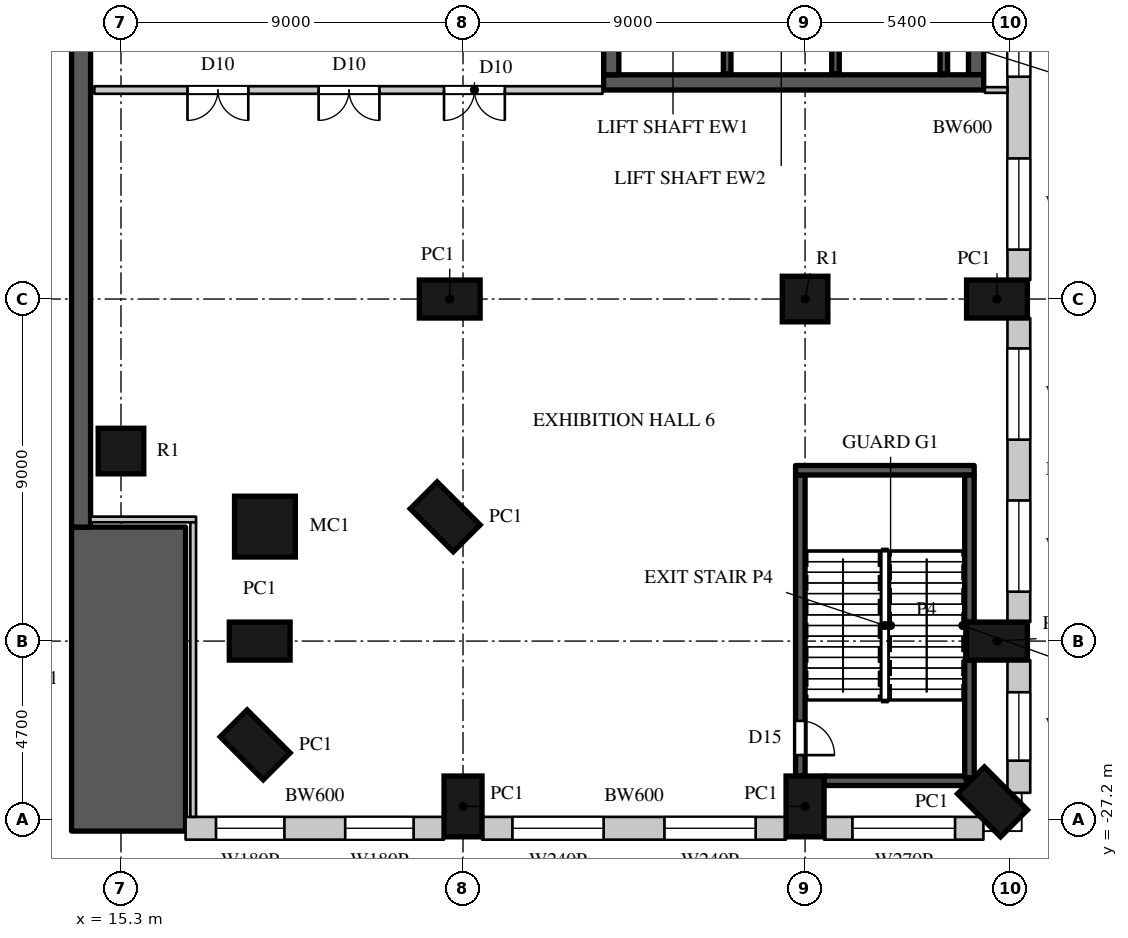
"""IFC4 building model, lengths in metres.
Left out: names, types, materials, properties, quantities, classifications, styles, units other than length and angle.
Written with IfcOpenShell. Run it as: python <this file> out.ifc"""

import sys

from ifc_helpers import new_model, si_unit, direction, frame, frame_2d, origin, origin_2d, place, context, subcontext, project, spatial, rectangle, circle, extrude, element, fill, save


model = new_model("IFC4")
c1 = context("Model", 3, precision=1e-05, world=origin(), true_north=direction((0.0, 1.0)))
c2 = subcontext(c1, "Body", "Model", "MODEL_VIEW")
j1 = project(units=[si_unit("LENGTHUNIT", "METRE"), si_unit("PLANEANGLEUNIT", "RADIAN")], contexts=[c1])
p1 = place(None, origin())
s1 = spatial("IfcSite", under=j1, at=p1, CompositionType="ELEMENT")
p2 = place(p1, origin())
s2 = spatial("IfcBuilding", under=s1, at=p2, CompositionType="ELEMENT")
p3 = place(p2, frame((0.0, 0.0, 9.0)))
s3 = spatial("IfcBuildingStorey", under=s2, at=p3, CompositionType="ELEMENT", Elevation=9.0)
p4 = place(p3, frame((15.5, -27.5, 0.0), z_axis=(0.0, 0.0, 1.0), x_axis=(0.0, 1.0, 0.0)))
e1 = element("IfcWall", 1, at=p4, inside=s3, PredefinedType="SOLIDWALL", context=c2, shape_type="SweptSolid", body=[
    extrude(rectangle(XDim=8.0, YDim=3.0, at=frame_2d((4.0, 0.0))), origin(), (0.0, 0.0, 1.0), 10.0),
])
p5 = place(p3, frame((14.25, -19.5, 0.0), z_axis=(0.0, 0.0, 1.0), x_axis=(0.0, 1.0, 0.0)))
e2 = element("IfcWall", 2, at=p5, inside=s3, PredefinedType="SOLIDWALL", context=c2, shape_type="SweptSolid", body=[
    extrude(rectangle(XDim=39.0, YDim=0.5, at=frame_2d((19.5, 0.0))), origin(), (0.0, 0.0, 1.0), 10.0),
])
for number, where, z_axis, x_axis in (
    (3, (18.831, -25.231, 0.0), (0.0, 0.0, 1.0), (0.707, 0.707, 0.0)),
    (4, (18.95, -22.5, 0.0), (0.0, 0.0, 1.0), (0.0, 1.0, 0.0)),
):
    element("IfcColumn", number, at=place(p3, frame(where, z_axis=z_axis, x_axis=x_axis)), inside=s3, PredefinedType="COLUMN", context=c2, shape_type="SweptSolid", body=[
        extrude(rectangle(XDim=1.0, YDim=1.6, at=origin_2d()), origin(), (0.0, 0.0, 1.0), 10.0),
    ])
p6 = place(p3, frame((19.088, -19.488, 0.0), z_axis=(0.0, 0.0, 1.0), x_axis=(1.0, 0.0, 0.0)))
e5 = element("IfcColumn", 5, at=p6, inside=s3, PredefinedType="COLUMN", context=c2, shape_type="SweptSolid", body=[
    extrude(circle(Radius=0.8, at=origin_2d()), origin(), (0.0, 0.0, 1.0), 10.0),
])
for number, where, z_axis, x_axis in (
    (6, (23.831, -19.231, 0.0), (0.0, 0.0, 1.0), (0.707, 0.707, 0.0)),
    (7, (23.95, -13.5, 0.0), (0.0, 0.0, 1.0), (0.0, 1.0, 0.0)),
    (8, (24.3, -26.85, 0.0), (0.0, 0.0, 1.0), (1.0, 0.0, 0.0)),
    (9, (33.3, -26.85, 0.0), (0.0, 0.0, 1.0), (1.0, 0.0, 0.0)),
    (10, (38.231, -26.731, 0.0), (0.0, 0.0, 1.0), (0.707, 0.707, 0.0)),
    (11, (38.35, -22.5, 0.0), (0.0, 0.0, 1.0), (0.0, 1.0, 0.0)),
    (12, (38.35, -13.5, 0.0), (0.0, 0.0, 1.0), (0.0, 1.0, 0.0)),
):
    element("IfcColumn", number, at=place(p3, frame(where, z_axis=z_axis, x_axis=x_axis)), inside=s3, PredefinedType="COLUMN", context=c2, shape_type="SweptSolid", body=[
        extrude(rectangle(XDim=1.0, YDim=1.6, at=origin_2d()), origin(), (0.0, 0.0, 1.0), 10.0),
    ])
for number, where, z_axis, x_axis in (
    (13, (15.3, -17.5, 0.0), (0.0, 0.0, 1.0), (1.0, 0.0, 0.0)),
    (14, (33.3, -13.5, 0.0), (0.0, 0.0, 1.0), (1.0, 0.0, 0.0)),
):
    element("IfcColumn", number, at=place(p3, frame(where, z_axis=z_axis, x_axis=x_axis)), inside=s3, PredefinedType="COLUMN", context=c2, shape_type="SweptSolid", body=[
        extrude(circle(Radius=0.6, at=origin_2d()), origin(), (0.0, 0.0, 1.0), 10.0),
    ])
p7 = place(p3, frame((17.0, -27.425, 0.0), z_axis=(0.0, 0.0, 1.0), x_axis=(1.0, 0.0, 0.0)))
e15 = element("IfcWall", 15, at=p7, inside=s3, PredefinedType="ELEMENTEDWALL", context=c2, shape_type="SweptSolid", body=[
    extrude(rectangle(XDim=6.8, YDim=0.6, at=frame_2d((3.4, 0.0))), origin(), (0.0, 0.0, 1.0), 9.6),
])
p8 = place(p7, frame((0.8, 0.0, 3.0)))
e16 = element("IfcOpeningElement", 16, at=p8, cuts=e15, PredefinedType="OPENING", context=c2, shape_type="SweptSolid", body=[
    extrude(rectangle(XDim=1.8, YDim=2.4, at=frame_2d((0.9, 1.2))), frame((0.0, 0.31, 0.0), z_axis=(0.0, -1.0, 0.0), x_axis=(1.0, 0.0, 0.0)), (0.0, 0.0, 1.0), 0.62),
])
p9 = place(p7, frame((4.2, 0.0, 3.0)))
e17 = element("IfcOpeningElement", 17, at=p9, cuts=e15, PredefinedType="OPENING", context=c2, shape_type="SweptSolid", body=[
    extrude(rectangle(XDim=1.8, YDim=2.4, at=frame_2d((0.9, 1.2))), frame((0.0, 0.31, 0.0), z_axis=(0.0, -1.0, 0.0), x_axis=(1.0, 0.0, 0.0)), (0.0, 0.0, 1.0), 0.62),
])
p10 = place(p3, frame((24.8, -27.425, 0.0), z_axis=(0.0, 0.0, 1.0), x_axis=(1.0, 0.0, 0.0)))
e18 = element("IfcWall", 18, at=p10, inside=s3, PredefinedType="ELEMENTEDWALL", context=c2, shape_type="SweptSolid", body=[
    extrude(rectangle(XDim=8.0, YDim=0.6, at=frame_2d((4.0, 0.0))), origin(), (0.0, 0.0, 1.0), 9.6),
])
p11 = place(p10, frame((0.8, 0.0, 3.0)))
e19 = element("IfcOpeningElement", 19, at=p11, cuts=e18, PredefinedType="OPENING", context=c2, shape_type="SweptSolid", body=[
    extrude(rectangle(XDim=2.4, YDim=2.4, at=frame_2d((1.2, 1.2))), frame((0.0, 0.31, 0.0), z_axis=(0.0, -1.0, 0.0), x_axis=(1.0, 0.0, 0.0)), (0.0, 0.0, 1.0), 0.62),
])
p12 = place(p10, frame((4.8, 0.0, 3.0)))
e20 = element("IfcOpeningElement", 20, at=p12, cuts=e18, PredefinedType="OPENING", context=c2, shape_type="SweptSolid", body=[
    extrude(rectangle(XDim=2.4, YDim=2.4, at=frame_2d((1.2, 1.2))), frame((0.0, 0.31, 0.0), z_axis=(0.0, -1.0, 0.0), x_axis=(1.0, 0.0, 0.0)), (0.0, 0.0, 1.0), 0.62),
])
p13 = place(p3, frame((33.8, -27.425, 0.0), z_axis=(0.0, 0.0, 1.0), x_axis=(1.0, 0.0, 0.0)))
e21 = element("IfcWall", 21, at=p13, inside=s3, PredefinedType="ELEMENTEDWALL", context=c2, shape_type="SweptSolid", body=[
    extrude(rectangle(XDim=4.193, YDim=0.6, at=frame_2d((2.096, 0.0))), origin(), (0.0, 0.0, 1.0), 9.6),
])
p14 = place(p13, frame((0.746, 0.0, 3.0)))
e22 = element("IfcOpeningElement", 22, at=p14, cuts=e21, PredefinedType="OPENING", context=c2, shape_type="SweptSolid", body=[
    extrude(rectangle(XDim=2.7, YDim=2.4, at=frame_2d((1.35, 1.2))), frame((0.0, 0.31, 0.0), z_axis=(0.0, -1.0, 0.0), x_axis=(1.0, 0.0, 0.0)), (0.0, 0.0, 1.0), 0.62),
])
p15 = place(p3, frame((38.925, -26.493, 0.0), z_axis=(0.0, 0.0, 1.0), x_axis=(0.0, 1.0, 0.0)))
e23 = element("IfcWall", 23, at=p15, inside=s3, PredefinedType="ELEMENTEDWALL", context=c2, shape_type="SweptSolid", body=[
    extrude(rectangle(XDim=3.493, YDim=0.6, at=frame_2d((1.747, 0.0))), origin(), (0.0, 0.0, 1.0), 9.6),
])
p16 = place(p15, frame((0.846, 0.0, 3.0)))
e24 = element("IfcOpeningElement", 24, at=p16, cuts=e23, PredefinedType="OPENING", context=c2, shape_type="SweptSolid", body=[
    extrude(rectangle(XDim=1.8, YDim=2.4, at=frame_2d((0.9, 1.2))), frame((0.0, 0.31, 0.0), z_axis=(0.0, -1.0, 0.0), x_axis=(1.0, 0.0, 0.0)), (0.0, 0.0, 1.0), 0.62),
])
p17 = place(p3, frame((38.925, -22.0, 0.0), z_axis=(0.0, 0.0, 1.0), x_axis=(0.0, 1.0, 0.0)))
e25 = element("IfcWall", 25, at=p17, inside=s3, PredefinedType="ELEMENTEDWALL", context=c2, shape_type="SweptSolid", body=[
    extrude(rectangle(XDim=8.0, YDim=0.6, at=frame_2d((4.0, 0.0))), origin(), (0.0, 0.0, 1.0), 9.6),
])
p18 = place(p17, frame((0.8, 0.0, 3.0)))
e26 = element("IfcOpeningElement", 26, at=p18, cuts=e25, PredefinedType="OPENING", context=c2, shape_type="SweptSolid", body=[
    extrude(rectangle(XDim=2.4, YDim=2.4, at=frame_2d((1.2, 1.2))), frame((0.0, 0.31, 0.0), z_axis=(0.0, -1.0, 0.0), x_axis=(1.0, 0.0, 0.0)), (0.0, 0.0, 1.0), 0.62),
])
p19 = place(p17, frame((4.8, 0.0, 3.0)))
e27 = element("IfcOpeningElement", 27, at=p19, cuts=e25, PredefinedType="OPENING", context=c2, shape_type="SweptSolid", body=[
    extrude(rectangle(XDim=2.4, YDim=2.4, at=frame_2d((1.2, 1.2))), frame((0.0, 0.31, 0.0), z_axis=(0.0, -1.0, 0.0), x_axis=(1.0, 0.0, 0.0)), (0.0, 0.0, 1.0), 0.62),
])
p20 = place(p3, frame((38.925, -13.0, 0.0), z_axis=(0.0, 0.0, 1.0), x_axis=(0.0, 1.0, 0.0)))
e28 = element("IfcWall", 28, at=p20, inside=s3, PredefinedType="ELEMENTEDWALL", context=c2, shape_type="SweptSolid", body=[
    extrude(rectangle(XDim=8.0, YDim=0.6, at=frame_2d((4.0, 0.0))), origin(), (0.0, 0.0, 1.0), 9.6),
])
p21 = place(p20, frame((0.8, 0.0, 3.0)))
e29 = element("IfcOpeningElement", 29, at=p21, cuts=e28, PredefinedType="OPENING", context=c2, shape_type="SweptSolid", body=[
    extrude(rectangle(XDim=2.4, YDim=2.4, at=frame_2d((1.2, 1.2))), frame((0.0, 0.31, 0.0), z_axis=(0.0, -1.0, 0.0), x_axis=(1.0, 0.0, 0.0)), (0.0, 0.0, 1.0), 0.62),
])
p22 = place(p20, frame((5.35, 0.0, 3.0)))
e30 = element("IfcOpeningElement", 30, at=p22, cuts=e28, PredefinedType="OPENING", context=c2, shape_type="SweptSolid", body=[
    extrude(rectangle(XDim=1.8, YDim=2.4, at=frame_2d((0.9, 1.2))), frame((0.0, 0.31, 0.0), z_axis=(0.0, -1.0, 0.0), x_axis=(1.0, 0.0, 0.0)), (0.0, 0.0, 1.0), 0.62),
])
p23 = place(p3, frame((28.0, -7.8, 0.0), z_axis=(0.0, 0.0, 1.0), x_axis=(1.0, 0.0, 0.0)))
e31 = element("IfcWall", 31, at=p23, inside=s3, PredefinedType="SHEAR", context=c2, shape_type="SweptSolid", body=[
    extrude(rectangle(XDim=10.0, YDim=0.4, at=frame_2d((5.0, 0.0))), origin(), (0.0, 0.0, 1.0), 10.0),
])
p24 = place(p3, frame((37.8, -7.6, 0.0), z_axis=(0.0, 0.0, 1.0), x_axis=(0.0, 1.0, 0.0)))
e32 = element("IfcWall", 32, at=p24, inside=s3, PredefinedType="SHEAR", context=c2, shape_type="SweptSolid", body=[
    extrude(rectangle(XDim=15.2, YDim=0.4, at=frame_2d((7.6, 0.0))), origin(), (0.0, 0.0, 1.0), 10.0),
])
p25 = place(p3, frame((28.2, -7.6, 0.0), z_axis=(0.0, 0.0, 1.0), x_axis=(0.0, 1.0, 0.0)))
e33 = element("IfcWall", 33, at=p25, inside=s3, PredefinedType="SHEAR", context=c2, shape_type="SweptSolid", body=[
    extrude(rectangle(XDim=15.2, YDim=0.4, at=frame_2d((7.6, 0.0))), origin(), (0.0, 0.0, 1.0), 10.0),
])
p26 = place(p25, frame((4.05, 0.0, 0.0)))
e34 = element("IfcOpeningElement", 34, at=p26, cuts=e33, PredefinedType="OPENING", context=c2, shape_type="SweptSolid", body=[
    extrude(rectangle(XDim=1.5, YDim=2.4, at=frame_2d((0.75, 1.2))), frame((0.0, 0.21, 0.0), z_axis=(0.0, -1.0, 0.0), x_axis=(1.0, 0.0, 0.0)), (0.0, 0.0, 1.0), 0.42),
])
p27 = place(p25, frame((6.95, 0.0, 0.0)))
e35 = element("IfcOpeningElement", 35, at=p27, cuts=e33, PredefinedType="OPENING", context=c2, shape_type="SweptSolid", body=[
    extrude(rectangle(XDim=1.5, YDim=2.4, at=frame_2d((0.75, 1.2))), frame((0.0, 0.21, 0.0), z_axis=(0.0, -1.0, 0.0), x_axis=(1.0, 0.0, 0.0)), (0.0, 0.0, 1.0), 0.42),
])
p28 = place(p3, frame((14.6, -8.0, 0.0), z_axis=(0.0, 0.0, 1.0), x_axis=(1.0, 0.0, 0.0)))
e36 = element("IfcWall", 36, at=p28, inside=s3, PredefinedType="PARTITIONING", context=c2, shape_type="SweptSolid", body=[
    extrude(rectangle(XDim=13.37, YDim=0.2, at=frame_2d((6.685, 0.0))), origin(), (0.0, 0.0, 1.0), 9.598),
])
p29 = place(p28, frame((5.9, 0.0, 0.0)))
e37 = element("IfcOpeningElement", 37, at=p29, cuts=e36, PredefinedType="OPENING", context=c2, shape_type="SweptSolid", body=[
    extrude(rectangle(XDim=1.6, YDim=2.4, at=frame_2d((0.8, 1.2))), frame((0.0, 0.11, 0.0), z_axis=(0.0, -1.0, 0.0), x_axis=(1.0, 0.0, 0.0)), (0.0, 0.0, 1.0), 0.22),
])
p30 = place(p28, frame((9.2, 0.0, 0.0)))
e38 = element("IfcOpeningElement", 38, at=p30, cuts=e36, PredefinedType="OPENING", context=c2, shape_type="SweptSolid", body=[
    extrude(rectangle(XDim=1.6, YDim=2.4, at=frame_2d((0.8, 1.2))), frame((0.0, 0.11, 0.0), z_axis=(0.0, -1.0, 0.0), x_axis=(1.0, 0.0, 0.0)), (0.0, 0.0, 1.0), 0.22),
])
p31 = place(p28, frame((2.45, 0.0, 0.0)))
e39 = element("IfcOpeningElement", 39, at=p31, cuts=e36, PredefinedType="OPENING", context=c2, shape_type="SweptSolid", body=[
    extrude(rectangle(XDim=1.6, YDim=2.4, at=frame_2d((0.8, 1.2))), frame((0.0, 0.11, 0.0), z_axis=(0.0, -1.0, 0.0), x_axis=(1.0, 0.0, 0.0)), (0.0, 0.0, 1.0), 0.22),
])
p32 = place(p3, frame((14.5, -19.3, 0.0), z_axis=(0.0, 0.0, 1.0), x_axis=(1.0, 0.0, 0.0)))
e40 = element("IfcWall", 40, at=p32, inside=s3, PredefinedType="PARTITIONING", context=c2, shape_type="SweptSolid", body=[
    extrude(rectangle(XDim=2.775, YDim=0.15, at=frame_2d((1.387, 0.0))), origin(), (0.0, 0.0, 1.0), 9.598),
])
p33 = place(p3, frame((17.2, -27.125, 0.0), z_axis=(0.0, 0.0, 1.0), x_axis=(0.0, 1.0, 0.0)))
e41 = element("IfcWall", 41, at=p33, inside=s3, PredefinedType="PARTITIONING", context=c2, shape_type="SweptSolid", body=[
    extrude(rectangle(XDim=7.75, YDim=0.15, at=frame_2d((3.875, 0.0))), origin(), (0.0, 0.0, 1.0), 9.598),
])
p34 = place(p3, frame((38.03, -8.0, 0.0), z_axis=(0.0, 0.0, 1.0), x_axis=(1.0, 0.0, 0.0)))
e42 = element("IfcWall", 42, at=p34, inside=s3, PredefinedType="PARTITIONING", context=c2, shape_type="SweptSolid", body=[
    extrude(rectangle(XDim=0.595, YDim=0.15, at=frame_2d((0.297, 0.0))), origin(), (0.0, 0.0, 1.0), 9.598),
])
for number, where, z_axis, x_axis in (
    (43, (31.25, -7.57, 0.0), (0.0, 0.0, 1.0), (0.0, 1.0, 0.0)),
    (44, (34.1, -7.57, 0.0), (0.0, 0.0, 1.0), (0.0, 1.0, 0.0)),
):
    element("IfcWall", number, at=place(p3, frame(where, z_axis=z_axis, x_axis=x_axis)), inside=s3, PredefinedType="SHEAR", context=c2, shape_type="SweptSolid", body=[
        extrude(rectangle(XDim=2.67, YDim=0.2, at=frame_2d((1.335, 0.0))), origin(), (0.0, 0.0, 1.0), 10.0),
    ])
p35 = place(p3, frame((36.95, -7.57, 0.0), z_axis=(0.0, 0.0, 1.0), x_axis=(0.0, 1.0, 0.0)))
e45 = element("IfcWall", 45, at=p35, inside=s3, PredefinedType="SHEAR", context=c2, shape_type="SweptSolid", body=[
    extrude(rectangle(XDim=2.67, YDim=0.2, at=frame_2d((1.335, 0.0))), origin(), (0.0, 0.0, 1.0), 9.598),
])
p36 = place(p3, frame((33.175, -26.05, 0.0), z_axis=(0.0, 0.0, 1.0), x_axis=(0.0, 1.0, 0.0)))
e46 = element("IfcWall", 46, at=p36, inside=s3, PredefinedType="SHEAR", context=c2, shape_type="SweptSolid", body=[
    extrude(rectangle(XDim=7.92, YDim=0.25, at=frame_2d((3.96, 0.0))), origin(), (0.0, 0.0, 1.0), 9.6),
])
p37 = place(p36, frame((0.55, 0.0, 0.0)))
e47 = element("IfcOpeningElement", 47, at=p37, cuts=e46, PredefinedType="OPENING", context=c2, shape_type="SweptSolid", body=[
    extrude(rectangle(XDim=0.9, YDim=2.2, at=frame_2d((0.45, 1.1))), frame((0.0, 0.135, 0.0), z_axis=(0.0, -1.0, 0.0), x_axis=(1.0, 0.0, 0.0)), (0.0, 0.0, 1.0), 0.27),
])
p38 = place(p3, frame((33.8, -26.175, 0.0), z_axis=(0.0, 0.0, 1.0), x_axis=(1.0, 0.0, 0.0)))
e48 = element("IfcWall", 48, at=p38, inside=s3, PredefinedType="SHEAR", context=c2, shape_type="SweptSolid", body=[
    extrude(rectangle(XDim=3.745, YDim=0.25, at=frame_2d((1.873, 0.0))), origin(), (0.0, 0.0, 1.0), 9.6),
])
p39 = place(p3, frame((33.05, -18.005, 0.0), z_axis=(0.0, 0.0, 1.0), x_axis=(1.0, 0.0, 0.0)))
e49 = element("IfcWall", 49, at=p39, inside=s3, PredefinedType="SHEAR", context=c2, shape_type="SweptSolid", body=[
    extrude(rectangle(XDim=4.7, YDim=0.25, at=frame_2d((2.35, 0.0))), origin(), (0.0, 0.0, 1.0), 9.6),
])
p40 = place(p3, frame((37.625, -26.095, 0.0), z_axis=(0.0, 0.0, 1.0), x_axis=(0.0, 1.0, 0.0)))
e50 = element("IfcWall", 50, at=p40, inside=s3, PredefinedType="SHEAR", context=c2, shape_type="SweptSolid", body=[
    extrude(rectangle(XDim=3.095, YDim=0.25, at=frame_2d((1.548, 0.0))), origin(), (0.0, 0.0, 1.0), 9.6),
])
p41 = place(p3, frame((37.625, -22.0, 0.0), z_axis=(0.0, 0.0, 1.0), x_axis=(0.0, 1.0, 0.0)))
e51 = element("IfcWall", 51, at=p41, inside=s3, PredefinedType="SHEAR", context=c2, shape_type="SweptSolid", body=[
    extrude(rectangle(XDim=3.87, YDim=0.25, at=frame_2d((1.935, 0.0))), origin(), (0.0, 0.0, 1.0), 9.6),
])
p42 = place(p8, origin())
e52 = element("IfcWindow", 52, at=p42, inside=s3, PartitioningType="SINGLE_PANEL", PredefinedType="WINDOW", context=c2, shape_type="SweptSolid", body=[
    extrude(rectangle(XDim=1.8, YDim=2.4, at=frame_2d((0.9, 1.2))), frame((0.0, 0.06, 0.0), z_axis=(0.0, -1.0, 0.0), x_axis=(1.0, 0.0, 0.0)), (0.0, 0.0, 1.0), 0.06),
])
fill(e16, e52)
p43 = place(p9, origin())
e53 = element("IfcWindow", 53, at=p43, inside=s3, PartitioningType="SINGLE_PANEL", PredefinedType="WINDOW", context=c2, shape_type="SweptSolid", body=[
    extrude(rectangle(XDim=1.8, YDim=2.4, at=frame_2d((0.9, 1.2))), frame((0.0, 0.06, 0.0), z_axis=(0.0, -1.0, 0.0), x_axis=(1.0, 0.0, 0.0)), (0.0, 0.0, 1.0), 0.06),
])
fill(e17, e53)
p44 = place(p11, origin())
e54 = element("IfcWindow", 54, at=p44, inside=s3, PartitioningType="SINGLE_PANEL", PredefinedType="WINDOW", context=c2, shape_type="SweptSolid", body=[
    extrude(rectangle(XDim=2.4, YDim=2.4, at=frame_2d((1.2, 1.2))), frame((0.0, 0.06, 0.0), z_axis=(0.0, -1.0, 0.0), x_axis=(1.0, 0.0, 0.0)), (0.0, 0.0, 1.0), 0.06),
])
fill(e19, e54)
p45 = place(p12, origin())
e55 = element("IfcWindow", 55, at=p45, inside=s3, PartitioningType="SINGLE_PANEL", PredefinedType="WINDOW", context=c2, shape_type="SweptSolid", body=[
    extrude(rectangle(XDim=2.4, YDim=2.4, at=frame_2d((1.2, 1.2))), frame((0.0, 0.06, 0.0), z_axis=(0.0, -1.0, 0.0), x_axis=(1.0, 0.0, 0.0)), (0.0, 0.0, 1.0), 0.06),
])
fill(e20, e55)
p46 = place(p14, origin())
e56 = element("IfcWindow", 56, at=p46, inside=s3, PartitioningType="SINGLE_PANEL", PredefinedType="WINDOW", context=c2, shape_type="SweptSolid", body=[
    extrude(rectangle(XDim=2.7, YDim=2.4, at=frame_2d((1.35, 1.2))), frame((0.0, 0.06, 0.0), z_axis=(0.0, -1.0, 0.0), x_axis=(1.0, 0.0, 0.0)), (0.0, 0.0, 1.0), 0.06),
])
fill(e22, e56)
p47 = place(p16, origin())
e57 = element("IfcWindow", 57, at=p47, inside=s3, PartitioningType="SINGLE_PANEL", PredefinedType="WINDOW", context=c2, shape_type="SweptSolid", body=[
    extrude(rectangle(XDim=1.8, YDim=2.4, at=frame_2d((0.9, 1.2))), frame((0.0, 0.06, 0.0), z_axis=(0.0, -1.0, 0.0), x_axis=(1.0, 0.0, 0.0)), (0.0, 0.0, 1.0), 0.06),
])
fill(e24, e57)
p48 = place(p18, origin())
e58 = element("IfcWindow", 58, at=p48, inside=s3, PartitioningType="SINGLE_PANEL", PredefinedType="WINDOW", context=c2, shape_type="SweptSolid", body=[
    extrude(rectangle(XDim=2.4, YDim=2.4, at=frame_2d((1.2, 1.2))), frame((0.0, 0.06, 0.0), z_axis=(0.0, -1.0, 0.0), x_axis=(1.0, 0.0, 0.0)), (0.0, 0.0, 1.0), 0.06),
])
fill(e26, e58)
p49 = place(p19, origin())
e59 = element("IfcWindow", 59, at=p49, inside=s3, PartitioningType="SINGLE_PANEL", PredefinedType="WINDOW", context=c2, shape_type="SweptSolid", body=[
    extrude(rectangle(XDim=2.4, YDim=2.4, at=frame_2d((1.2, 1.2))), frame((0.0, 0.06, 0.0), z_axis=(0.0, -1.0, 0.0), x_axis=(1.0, 0.0, 0.0)), (0.0, 0.0, 1.0), 0.06),
])
fill(e27, e59)
p50 = place(p21, origin())
e60 = element("IfcWindow", 60, at=p50, inside=s3, PartitioningType="SINGLE_PANEL", PredefinedType="WINDOW", context=c2, shape_type="SweptSolid", body=[
    extrude(rectangle(XDim=2.4, YDim=2.4, at=frame_2d((1.2, 1.2))), frame((0.0, 0.06, 0.0), z_axis=(0.0, -1.0, 0.0), x_axis=(1.0, 0.0, 0.0)), (0.0, 0.0, 1.0), 0.06),
])
fill(e29, e60)
p51 = place(p29, origin())
e61 = element("IfcDoor", 61, at=p51, inside=s3, OperationType="DOUBLE_DOOR_SINGLE_SWING", PredefinedType="DOOR", context=c2, shape_type="SweptSolid", body=[
    extrude(rectangle(XDim=1.6, YDim=2.4, at=frame_2d((0.8, 1.2))), frame((0.0, 0.025, 0.0), z_axis=(0.0, -1.0, 0.0), x_axis=(1.0, 0.0, 0.0)), (0.0, 0.0, 1.0), 0.05),
])
fill(e37, e61)
p52 = place(p30, origin())
e62 = element("IfcDoor", 62, at=p52, inside=s3, OperationType="DOUBLE_DOOR_SINGLE_SWING", PredefinedType="DOOR", context=c2, shape_type="SweptSolid", body=[
    extrude(rectangle(XDim=1.6, YDim=2.4, at=frame_2d((0.8, 1.2))), frame((0.0, 0.025, 0.0), z_axis=(0.0, -1.0, 0.0), x_axis=(1.0, 0.0, 0.0)), (0.0, 0.0, 1.0), 0.05),
])
fill(e38, e62)
p53 = place(p31, origin())
e63 = element("IfcDoor", 63, at=p53, inside=s3, OperationType="DOUBLE_DOOR_SINGLE_SWING", PredefinedType="DOOR", context=c2, shape_type="SweptSolid", body=[
    extrude(rectangle(XDim=1.6, YDim=2.4, at=frame_2d((0.8, 1.2))), frame((0.0, 0.025, 0.0), z_axis=(0.0, -1.0, 0.0), x_axis=(1.0, 0.0, 0.0)), (0.0, 0.0, 1.0), 0.05),
])
fill(e39, e63)
p54 = place(p37, origin())
e64 = element("IfcDoor", 64, at=p54, inside=s3, OperationType="SINGLE_SWING_RIGHT", PredefinedType="DOOR", context=c2, shape_type="SweptSolid", body=[
    extrude(rectangle(XDim=0.9, YDim=2.2, at=frame_2d((0.45, 1.1))), frame((0.0, 0.025, 0.0), z_axis=(0.0, -1.0, 0.0), x_axis=(1.0, 0.0, 0.0)), (0.0, 0.0, 1.0), 0.05),
])
fill(e47, e64)
p55 = place(p22, origin())
e65 = element("IfcWindow", 65, at=p55, inside=s3, PartitioningType="SINGLE_PANEL", PredefinedType="WINDOW", context=c2, shape_type="SweptSolid", body=[
    extrude(rectangle(XDim=1.8, YDim=2.4, at=frame_2d((0.9, 1.2))), frame((0.0, 0.06, 0.0), z_axis=(0.0, -1.0, 0.0), x_axis=(1.0, 0.0, 0.0)), (0.0, 0.0, 1.0), 0.06),
])
fill(e30, e65)
save(model, sys.argv[1])
